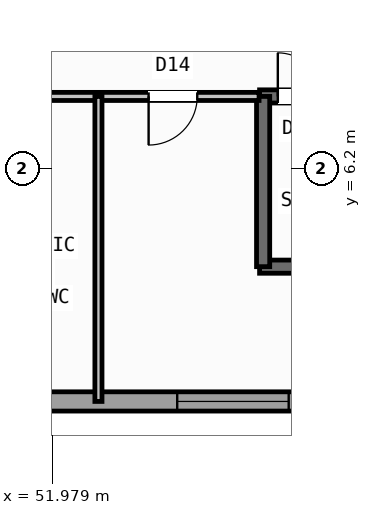
"""IFC4 building model, lengths in metres.
Left out: names, types, materials, properties, quantities, classifications, styles, units other than length and angle.
Written with IfcOpenShell. Run it as: python <this file> out.ifc"""

import sys

from ifc_helpers import new_model, si_unit, direction, frame, frame_2d, origin, place, context, subcontext, project, spatial, rectangle, extrude, source, transform, mapped, element, fill, save


model = new_model("IFC4")
c1 = context("Model", 3, precision=1e-05, world=origin(), true_north=direction((0.0, 1.0)))
c2 = subcontext(c1, "Body", "Model", "MODEL_VIEW")
j1 = project(units=[si_unit("LENGTHUNIT", "METRE"), si_unit("PLANEANGLEUNIT", "RADIAN")], contexts=[c1])
p1 = place(None, origin())
s1 = spatial("IfcSite", under=j1, at=p1, CompositionType="ELEMENT")
p2 = place(p1, origin())
s2 = spatial("IfcBuilding", under=s1, at=p2, CompositionType="ELEMENT")
p3 = place(p2, frame((0.0, 0.0, 10.2)))
s3 = spatial("IfcBuildingStorey", under=s2, at=p3, CompositionType="ELEMENT", Elevation=10.2)
p4 = place(p3, frame((67.117, 1.6, 0.0), z_axis=(0.0, 0.0, 1.0), x_axis=(-1.0, 0.0, 0.0)))
e1 = element("IfcWall", 1, at=p4, inside=s3, PredefinedType="STANDARD", context=c2, shape_type="SweptSolid", body=[
    extrude(rectangle(XDim=62.234, YDim=0.38, at=frame_2d((31.117, 0.0))), origin(), (0.0, 0.0, 1.0), 3.85),
])
p5 = place(p4, frame((1.735, 0.0, 0.85)))
e2 = element("IfcOpeningElement", 2, at=p5, cuts=e1, PredefinedType="OPENING", context=c2, shape_type="SweptSolid", body=[
    extrude(rectangle(XDim=2.2, YDim=1.75, at=frame_2d((1.1, 0.875))), frame((0.0, 0.2, 0.0), z_axis=(0.0, -1.0, 0.0), x_axis=(1.0, 0.0, 0.0)), (0.0, 0.0, 1.0), 0.4),
])
p6 = place(p4, frame((6.104, 0.0, 0.85)))
e3 = element("IfcOpeningElement", 3, at=p6, cuts=e1, PredefinedType="OPENING", context=c2, shape_type="SweptSolid", body=[
    extrude(rectangle(XDim=2.2, YDim=1.75, at=frame_2d((1.1, 0.875))), frame((0.0, 0.2, 0.0), z_axis=(0.0, -1.0, 0.0), x_axis=(1.0, 0.0, 0.0)), (0.0, 0.0, 1.0), 0.4),
])
p7 = place(p4, frame((10.473, 0.0, 0.85)))
e4 = element("IfcOpeningElement", 4, at=p7, cuts=e1, PredefinedType="OPENING", context=c2, shape_type="SweptSolid", body=[
    extrude(rectangle(XDim=2.2, YDim=1.75, at=frame_2d((1.1, 0.875))), frame((0.0, 0.2, 0.0), z_axis=(0.0, -1.0, 0.0), x_axis=(1.0, 0.0, 0.0)), (0.0, 0.0, 1.0), 0.4),
])
p8 = place(p4, frame((15.277, 0.0, 1.0)))
e5 = element("IfcOpeningElement", 5, at=p8, cuts=e1, PredefinedType="OPENING", context=c2, shape_type="SweptSolid", body=[
    extrude(rectangle(XDim=1.1, YDim=1.35, at=frame_2d((0.55, 0.675))), frame((0.0, 0.2, 0.0), z_axis=(0.0, -1.0, 0.0), x_axis=(1.0, 0.0, 0.0)), (0.0, 0.0, 1.0), 0.4),
])
p9 = place(p4, frame((18.422, 0.0, 0.95)))
e6 = element("IfcOpeningElement", 6, at=p9, cuts=e1, PredefinedType="OPENING", context=c2, shape_type="SweptSolid", body=[
    extrude(rectangle(XDim=1.4, YDim=1.5, at=frame_2d((0.7, 0.75))), frame((0.0, 0.2, 0.0), z_axis=(0.0, -1.0, 0.0), x_axis=(1.0, 0.0, 0.0)), (0.0, 0.0, 1.0), 0.4),
])
p10 = place(p4, frame((21.967, 0.0, 1.0)))
e7 = element("IfcOpeningElement", 7, at=p10, cuts=e1, PredefinedType="OPENING", context=c2, shape_type="SweptSolid", body=[
    extrude(rectangle(XDim=1.1, YDim=1.35, at=frame_2d((0.55, 0.675))), frame((0.0, 0.2, 0.0), z_axis=(0.0, -1.0, 0.0), x_axis=(1.0, 0.0, 0.0)), (0.0, 0.0, 1.0), 0.4),
])
p11 = place(p4, frame((24.387, 0.0, 1.0)))
e8 = element("IfcOpeningElement", 8, at=p11, cuts=e1, PredefinedType="OPENING", context=c2, shape_type="SweptSolid", body=[
    extrude(rectangle(XDim=1.1, YDim=1.35, at=frame_2d((0.55, 0.675))), frame((0.0, 0.2, 0.0), z_axis=(0.0, -1.0, 0.0), x_axis=(1.0, 0.0, 0.0)), (0.0, 0.0, 1.0), 0.4),
])
p12 = place(p4, frame((28.167, 0.0, 0.95)))
e9 = element("IfcOpeningElement", 9, at=p12, cuts=e1, PredefinedType="OPENING", context=c2, shape_type="SweptSolid", body=[
    extrude(rectangle(XDim=1.4, YDim=1.5, at=frame_2d((0.7, 0.75))), frame((0.0, 0.2, 0.0), z_axis=(0.0, -1.0, 0.0), x_axis=(1.0, 0.0, 0.0)), (0.0, 0.0, 1.0), 0.4),
])
p13 = place(p4, frame((31.687, 0.0, 0.95)))
e10 = element("IfcOpeningElement", 10, at=p13, cuts=e1, PredefinedType="OPENING", context=c2, shape_type="SweptSolid", body=[
    extrude(rectangle(XDim=1.4, YDim=1.5, at=frame_2d((0.7, 0.75))), frame((0.0, 0.2, 0.0), z_axis=(0.0, -1.0, 0.0), x_axis=(1.0, 0.0, 0.0)), (0.0, 0.0, 1.0), 0.4),
])
p14 = place(p4, frame((35.767, 0.0, 0.85)))
e11 = element("IfcOpeningElement", 11, at=p14, cuts=e1, PredefinedType="OPENING", context=c2, shape_type="SweptSolid", body=[
    extrude(rectangle(XDim=2.2, YDim=1.75, at=frame_2d((1.1, 0.875))), frame((0.0, 0.2, 0.0), z_axis=(0.0, -1.0, 0.0), x_axis=(1.0, 0.0, 0.0)), (0.0, 0.0, 1.0), 0.4),
])
p15 = place(p4, frame((39.287, 0.0, 0.85)))
e12 = element("IfcOpeningElement", 12, at=p15, cuts=e1, PredefinedType="OPENING", context=c2, shape_type="SweptSolid", body=[
    extrude(rectangle(XDim=2.2, YDim=1.75, at=frame_2d((1.1, 0.875))), frame((0.0, 0.2, 0.0), z_axis=(0.0, -1.0, 0.0), x_axis=(1.0, 0.0, 0.0)), (0.0, 0.0, 1.0), 0.4),
])
p16 = place(p4, frame((43.712, 0.0, 1.0)))
e13 = element("IfcOpeningElement", 13, at=p16, cuts=e1, PredefinedType="OPENING", context=c2, shape_type="SweptSolid", body=[
    extrude(rectangle(XDim=1.1, YDim=1.35, at=frame_2d((0.55, 0.675))), frame((0.0, 0.2, 0.0), z_axis=(0.0, -1.0, 0.0), x_axis=(1.0, 0.0, 0.0)), (0.0, 0.0, 1.0), 0.4),
])
p17 = place(p4, frame((46.021, 0.0, 1.0)))
e14 = element("IfcOpeningElement", 14, at=p17, cuts=e1, PredefinedType="OPENING", context=c2, shape_type="SweptSolid", body=[
    extrude(rectangle(XDim=1.1, YDim=1.35, at=frame_2d((0.55, 0.675))), frame((0.0, 0.2, 0.0), z_axis=(0.0, -1.0, 0.0), x_axis=(1.0, 0.0, 0.0)), (0.0, 0.0, 1.0), 0.4),
])
p18 = place(p4, frame((48.331, 0.0, 1.0)))
e15 = element("IfcOpeningElement", 15, at=p18, cuts=e1, PredefinedType="OPENING", context=c2, shape_type="SweptSolid", body=[
    extrude(rectangle(XDim=1.1, YDim=1.35, at=frame_2d((0.55, 0.675))), frame((0.0, 0.2, 0.0), z_axis=(0.0, -1.0, 0.0), x_axis=(1.0, 0.0, 0.0)), (0.0, 0.0, 1.0), 0.4),
])
p19 = place(p4, frame((50.641, 0.0, 1.0)))
e16 = element("IfcOpeningElement", 16, at=p19, cuts=e1, PredefinedType="OPENING", context=c2, shape_type="SweptSolid", body=[
    extrude(rectangle(XDim=1.1, YDim=1.35, at=frame_2d((0.55, 0.675))), frame((0.0, 0.2, 0.0), z_axis=(0.0, -1.0, 0.0), x_axis=(1.0, 0.0, 0.0)), (0.0, 0.0, 1.0), 0.4),
])
p20 = place(p4, frame((52.951, 0.0, 1.0)))
e17 = element("IfcOpeningElement", 17, at=p20, cuts=e1, PredefinedType="OPENING", context=c2, shape_type="SweptSolid", body=[
    extrude(rectangle(XDim=1.1, YDim=1.35, at=frame_2d((0.55, 0.675))), frame((0.0, 0.2, 0.0), z_axis=(0.0, -1.0, 0.0), x_axis=(1.0, 0.0, 0.0)), (0.0, 0.0, 1.0), 0.4),
])
p21 = place(p4, frame((55.26, 0.0, 1.0)))
e18 = element("IfcOpeningElement", 18, at=p21, cuts=e1, PredefinedType="OPENING", context=c2, shape_type="SweptSolid", body=[
    extrude(rectangle(XDim=1.1, YDim=1.35, at=frame_2d((0.55, 0.675))), frame((0.0, 0.2, 0.0), z_axis=(0.0, -1.0, 0.0), x_axis=(1.0, 0.0, 0.0)), (0.0, 0.0, 1.0), 0.4),
])
p22 = place(p4, frame((57.57, 0.0, 1.0)))
e19 = element("IfcOpeningElement", 19, at=p22, cuts=e1, PredefinedType="OPENING", context=c2, shape_type="SweptSolid", body=[
    extrude(rectangle(XDim=1.1, YDim=1.35, at=frame_2d((0.55, 0.675))), frame((0.0, 0.2, 0.0), z_axis=(0.0, -1.0, 0.0), x_axis=(1.0, 0.0, 0.0)), (0.0, 0.0, 1.0), 0.4),
])
p23 = place(p4, frame((59.879, 0.0, 1.0)))
e20 = element("IfcOpeningElement", 20, at=p23, cuts=e1, PredefinedType="OPENING", context=c2, shape_type="SweptSolid", body=[
    extrude(rectangle(XDim=1.1, YDim=1.35, at=frame_2d((0.55, 0.675))), frame((0.0, 0.2, 0.0), z_axis=(0.0, -1.0, 0.0), x_axis=(1.0, 0.0, 0.0)), (0.0, 0.0, 1.0), 0.4),
])
p24 = place(p3, frame((56.07, 7.62, 0.0), z_axis=(0.0, 0.0, 1.0), x_axis=(1.0, 0.0, 0.0)))
e21 = element("IfcWall", 21, at=p24, inside=s3, PredefinedType="SHEAR", context=c2, shape_type="SweptSolid", body=[
    extrude(rectangle(XDim=7.66, YDim=0.26, at=frame_2d((3.83, 0.0))), origin(), (0.0, 0.0, 1.0), 4.0),
])
p25 = place(p24, frame((0.36, 0.0, 0.0)))
e22 = element("IfcOpeningElement", 22, at=p25, cuts=e21, PredefinedType="OPENING", context=c2, shape_type="SweptSolid", body=[
    extrude(rectangle(XDim=0.86, YDim=2.05, at=frame_2d((0.43, 1.025))), frame((0.0, 0.14, 0.0), z_axis=(0.0, -1.0, 0.0), x_axis=(1.0, 0.0, 0.0)), (0.0, 0.0, 1.0), 0.28),
])
p26 = place(p3, frame((56.07, 4.26, 0.0), z_axis=(0.0, 0.0, 1.0), x_axis=(1.0, 0.0, 0.0)))
e23 = element("IfcWall", 23, at=p26, inside=s3, PredefinedType="SHEAR", context=c2, shape_type="SweptSolid", body=[
    extrude(rectangle(XDim=7.66, YDim=0.26, at=frame_2d((3.83, 0.0))), origin(), (0.0, 0.0, 1.0), 4.0),
])
p27 = place(p3, frame((56.14, 4.26, 0.0), z_axis=(0.0, 0.0, 1.0), x_axis=(0.0, 1.0, 0.0)))
e24 = element("IfcWall", 24, at=p27, inside=s3, PredefinedType="SHEAR", context=c2, shape_type="SweptSolid", body=[
    extrude(rectangle(XDim=3.36, YDim=0.26, at=frame_2d((1.68, 0.0))), origin(), (0.0, 0.0, 1.0), 4.0),
])
p28 = place(p3, frame((16.74, 7.62, 0.0), z_axis=(0.0, 0.0, 1.0), x_axis=(1.0, 0.0, 0.0)))
e25 = element("IfcWall", 25, at=p28, inside=s3, PredefinedType="PARTITIONING", context=c2, shape_type="SweptSolid", body=[
    extrude(rectangle(XDim=39.32, YDim=0.16, at=frame_2d((19.66, 0.0))), origin(), (0.0, 0.0, 1.0), 3.84),
])
p29 = place(p28, frame((1.26, 0.0, 0.0)))
e26 = element("IfcOpeningElement", 26, at=p29, cuts=e25, PredefinedType="OPENING", context=c2, shape_type="SweptSolid", body=[
    extrude(rectangle(XDim=1.08, YDim=2.15, at=frame_2d((0.54, 1.075))), frame((0.0, 0.09, 0.0), z_axis=(0.0, -1.0, 0.0), x_axis=(1.0, 0.0, 0.0)), (0.0, 0.0, 1.0), 0.18),
])
p30 = place(p28, frame((8.74, 0.0, 0.0)))
e27 = element("IfcOpeningElement", 27, at=p30, cuts=e25, PredefinedType="OPENING", context=c2, shape_type="SweptSolid", body=[
    extrude(rectangle(XDim=1.08, YDim=2.15, at=frame_2d((0.54, 1.075))), frame((0.0, 0.09, 0.0), z_axis=(0.0, -1.0, 0.0), x_axis=(1.0, 0.0, 0.0)), (0.0, 0.0, 1.0), 0.18),
])
p31 = place(p28, frame((16.74, 0.0, 0.0)))
e28 = element("IfcOpeningElement", 28, at=p31, cuts=e25, PredefinedType="OPENING", context=c2, shape_type="SweptSolid", body=[
    extrude(rectangle(XDim=1.08, YDim=2.15, at=frame_2d((0.54, 1.075))), frame((0.0, 0.09, 0.0), z_axis=(0.0, -1.0, 0.0), x_axis=(1.0, 0.0, 0.0)), (0.0, 0.0, 1.0), 0.18),
])
p32 = place(p28, frame((24.74, 0.0, 0.0)))
e29 = element("IfcOpeningElement", 29, at=p32, cuts=e25, PredefinedType="OPENING", context=c2, shape_type="SweptSolid", body=[
    extrude(rectangle(XDim=1.08, YDim=2.15, at=frame_2d((0.54, 1.075))), frame((0.0, 0.09, 0.0), z_axis=(0.0, -1.0, 0.0), x_axis=(1.0, 0.0, 0.0)), (0.0, 0.0, 1.0), 0.18),
])
p33 = place(p28, frame((30.54, 0.0, 0.0)))
e30 = element("IfcOpeningElement", 30, at=p33, cuts=e25, PredefinedType="OPENING", context=c2, shape_type="SweptSolid", body=[
    extrude(rectangle(XDim=0.88, YDim=2.08, at=frame_2d((0.44, 1.04))), frame((0.0, 0.09, 0.0), z_axis=(0.0, -1.0, 0.0), x_axis=(1.0, 0.0, 0.0)), (0.0, 0.0, 1.0), 0.18),
])
p34 = place(p28, frame((33.94, 0.0, 0.0)))
e31 = element("IfcOpeningElement", 31, at=p34, cuts=e25, PredefinedType="OPENING", context=c2, shape_type="SweptSolid", body=[
    extrude(rectangle(XDim=0.88, YDim=2.08, at=frame_2d((0.44, 1.04))), frame((0.0, 0.09, 0.0), z_axis=(0.0, -1.0, 0.0), x_axis=(1.0, 0.0, 0.0)), (0.0, 0.0, 1.0), 0.18),
])
p35 = place(p28, frame((37.14, 0.0, 0.0)))
e32 = element("IfcOpeningElement", 32, at=p35, cuts=e25, PredefinedType="OPENING", context=c2, shape_type="SweptSolid", body=[
    extrude(rectangle(XDim=0.96, YDim=2.08, at=frame_2d((0.48, 1.04))), frame((0.0, 0.09, 0.0), z_axis=(0.0, -1.0, 0.0), x_axis=(1.0, 0.0, 0.0)), (0.0, 0.0, 1.0), 0.18),
])
p36 = place(p3, frame((52.89, 1.6, 0.0), z_axis=(0.0, 0.0, 1.0), x_axis=(0.0, 1.0, 0.0)))
e33 = element("IfcWall", 33, at=p36, inside=s3, PredefinedType="PLUMBINGWALL", context=c2, shape_type="SweptSolid", body=[
    extrude(rectangle(XDim=6.02, YDim=0.14, at=frame_2d((3.01, 0.0))), origin(), (0.0, 0.0, 1.0), 3.84),
])
m1 = source(origin(), c2, "Body", "SweptSolid", [
    extrude(rectangle(XDim=2.2, YDim=1.75, at=frame_2d((1.1, 0.875))), frame((0.0, 0.03, 0.0), z_axis=(0.0, -1.0, 0.0), x_axis=(1.0, 0.0, 0.0)), (0.0, 0.0, 1.0), 0.06),
])
p37 = place(p7, origin())
e34 = element("IfcWindow", 34, at=p37, inside=s3, PartitioningType="SINGLE_PANEL", PredefinedType="WINDOW", context=c2, shape_type="MappedRepresentation", body=[
    mapped(m1, transform((0.0, 0.0, 0.0), scale=1.0)),
])
fill(e4, e34)
m2 = source(origin(), c2, "Body", "SweptSolid", [
    extrude(rectangle(XDim=0.86, YDim=2.05, at=frame_2d((0.43, 1.025))), frame((0.0, 0.025, 0.0), z_axis=(0.0, -1.0, 0.0), x_axis=(1.0, 0.0, 0.0)), (0.0, 0.0, 1.0), 0.05),
])
p38 = place(p25, origin())
e35 = element("IfcDoor", 35, at=p38, inside=s3, OperationType="SINGLE_SWING_LEFT", PredefinedType="DOOR", context=c2, shape_type="MappedRepresentation", body=[
    mapped(m2, transform((0.0, 0.0, 0.0), scale=1.0)),
])
fill(e22, e35)
m3 = source(origin(), c2, "Body", "SweptSolid", [
    extrude(rectangle(XDim=0.96, YDim=2.08, at=frame_2d((0.48, 1.04))), frame((0.0, 0.025, 0.0), z_axis=(0.0, -1.0, 0.0), x_axis=(1.0, 0.0, 0.0)), (0.0, 0.0, 1.0), 0.05),
])
p39 = place(p35, frame((0.96, 0.0, 0.0), z_axis=(0.0, 0.0, 1.0), x_axis=(-1.0, 0.0, 0.0)))
e36 = element("IfcDoor", 36, at=p39, inside=s3, OperationType="SINGLE_SWING_RIGHT", PredefinedType="DOOR", context=c2, shape_type="MappedRepresentation", body=[
    mapped(m3, transform((0.0, 0.0, 0.0), scale=1.0)),
])
fill(e32, e36)
save(model, sys.argv[1])
